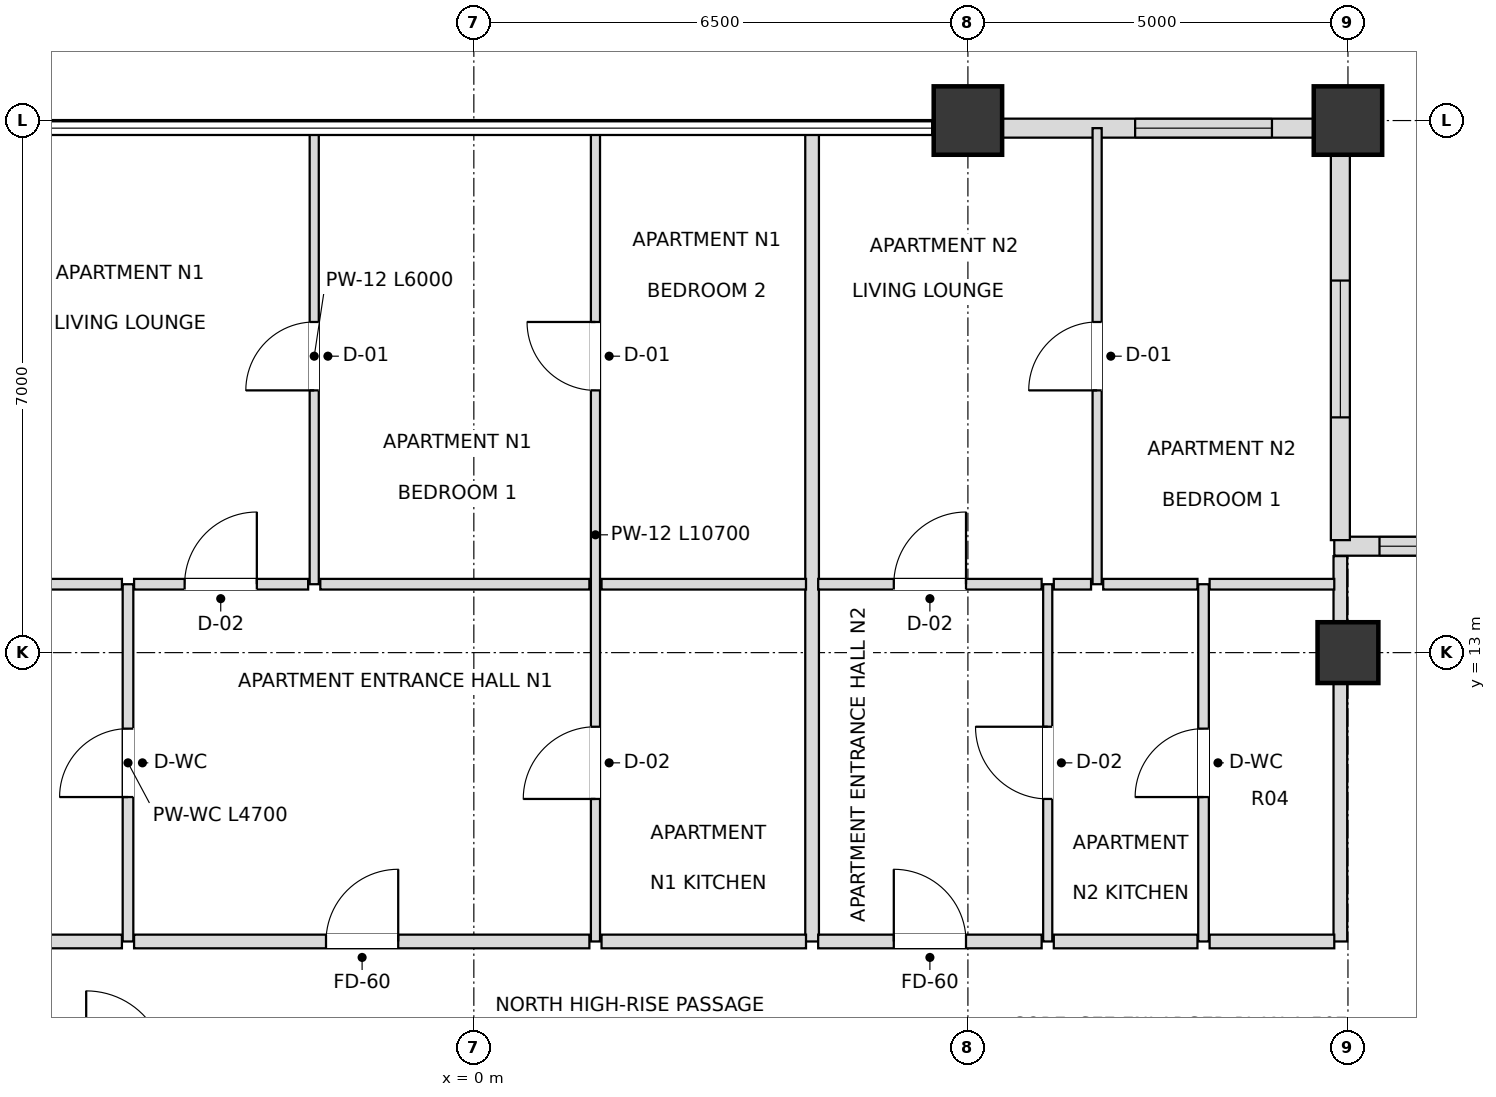
"""IFC4 building model, lengths in metres.
Left out: names, types, materials, properties, quantities, classifications, styles, units other than length and angle.
Written with IfcOpenShell. Run it as: python <this file> out.ifc"""

import sys

from ifc_helpers import new_model, si_unit, direction, frame, frame_2d, origin, origin_2d, place, context, subcontext, project, spatial, rectangle, extrude, element, fill, save


model = new_model("IFC4")
c1 = context("Model", 3, precision=1e-05, world=origin(), true_north=direction((0.0, 1.0)))
c2 = subcontext(c1, "Body", "Model", "MODEL_VIEW")
j1 = project(units=[si_unit("LENGTHUNIT", "METRE"), si_unit("PLANEANGLEUNIT", "RADIAN")], contexts=[c1])
p1 = place(None, origin())
s1 = spatial("IfcSite", under=j1, at=p1, CompositionType="ELEMENT")
p2 = place(p1, origin())
s2 = spatial("IfcBuilding", under=s1, at=p2, CompositionType="ELEMENT")
p3 = place(p2, frame((0.0, 0.0, 247.5)))
s3 = spatial("IfcBuildingStorey", under=s2, at=p3, CompositionType="ELEMENT", Elevation=247.5)
for number, where, z_axis, x_axis in (
    (1, (11.5, 20.0, 0.0), (0.0, 0.0, 1.0), (1.0, 0.0, 0.0)),
    (2, (6.5, 20.0, 0.0), (0.0, 0.0, 1.0), (1.0, 0.0, 0.0)),
):
    element("IfcColumn", number, at=place(p3, frame(where, z_axis=z_axis, x_axis=x_axis)), inside=s3, PredefinedType="USERDEFINED", context=c2, shape_type="SweptSolid", body=[
        extrude(rectangle(XDim=0.9, YDim=0.9, at=origin_2d()), origin(), (0.0, 0.0, 1.0), 3.6),
    ])
p4 = place(p3, frame((11.5, 13.0, 0.0), z_axis=(0.0, 0.0, 1.0), x_axis=(1.0, 0.0, 0.0)))
e3 = element("IfcColumn", 3, at=p4, inside=s3, PredefinedType="COLUMN", context=c2, shape_type="SweptSolid", body=[
    extrude(rectangle(XDim=0.8, YDim=0.8, at=origin_2d()), origin(), (0.0, 0.0, 1.0), 3.6),
])
p5 = place(p3, frame((11.055, 19.9, 0.0), z_axis=(0.0, 0.0, 1.0), x_axis=(-1.0, 0.0, 0.0)))
e4 = element("IfcWall", 4, at=p5, inside=s3, PredefinedType="SOLIDWALL", context=c2, shape_type="SweptSolid", body=[
    extrude(rectangle(XDim=4.11, YDim=0.25, at=frame_2d((2.055, 0.0))), origin(), (0.0, 0.0, 1.0), 2.748),
])
p6 = place(p5, frame((0.555, 0.0, 0.72)))
e5 = element("IfcOpeningElement", 5, at=p6, cuts=e4, PredefinedType="OPENING", context=c2, shape_type="SweptSolid", body=[
    extrude(rectangle(XDim=1.8, YDim=1.68, at=frame_2d((0.9, 0.84))), frame((0.0, 0.135, 0.0), z_axis=(0.0, -1.0, 0.0), x_axis=(1.0, 0.0, 0.0)), (0.0, 0.0, 1.0), 0.27),
])
p7 = place(p3, frame((16.98, 14.4, 0.0), z_axis=(0.0, 0.0, 1.0), x_axis=(-1.0, 0.0, 0.0)))
e6 = element("IfcWall", 6, at=p7, inside=s3, PredefinedType="SOLIDWALL", context=c2, shape_type="SweptSolid", body=[
    extrude(rectangle(XDim=5.66, YDim=0.25, at=frame_2d((2.83, 0.0))), origin(), (0.0, 0.0, 1.0), 2.748),
])
p8 = place(p7, frame((0.595, 0.0, 0.72)))
e7 = element("IfcOpeningElement", 7, at=p8, cuts=e6, PredefinedType="OPENING", context=c2, shape_type="SweptSolid", body=[
    extrude(rectangle(XDim=1.8, YDim=1.68, at=frame_2d((0.9, 0.84))), frame((0.0, 0.135, 0.0), z_axis=(0.0, -1.0, 0.0), x_axis=(1.0, 0.0, 0.0)), (0.0, 0.0, 1.0), 0.27),
])
p9 = place(p7, frame((3.265, 0.0, 0.72)))
e8 = element("IfcOpeningElement", 8, at=p9, cuts=e6, PredefinedType="OPENING", context=c2, shape_type="SweptSolid", body=[
    extrude(rectangle(XDim=1.8, YDim=1.68, at=frame_2d((0.9, 0.84))), frame((0.0, 0.135, 0.0), z_axis=(0.0, -1.0, 0.0), x_axis=(1.0, 0.0, 0.0)), (0.0, 0.0, 1.0), 0.27),
])
p10 = place(p3, frame((11.4, 14.48, 0.0), z_axis=(0.0, 0.0, 1.0), x_axis=(0.0, 1.0, 0.0)))
e9 = element("IfcWall", 9, at=p10, inside=s3, PredefinedType="SOLIDWALL", context=c2, shape_type="SweptSolid", body=[
    extrude(rectangle(XDim=5.34, YDim=0.25, at=frame_2d((2.67, 0.0))), origin(), (0.0, 0.0, 1.0), 2.748),
])
p11 = place(p10, frame((1.615, 0.0, 0.72)))
e10 = element("IfcOpeningElement", 10, at=p11, cuts=e9, PredefinedType="OPENING", context=c2, shape_type="SweptSolid", body=[
    extrude(rectangle(XDim=1.8, YDim=1.68, at=frame_2d((0.9, 0.84))), frame((0.0, 0.135, 0.0), z_axis=(0.0, -1.0, 0.0), x_axis=(1.0, 0.0, 0.0)), (0.0, 0.0, 1.0), 0.27),
])
p12 = place(p3, frame((-4.55, 9.2, 0.0), z_axis=(0.0, 0.0, 1.0), x_axis=(0.0, 1.0, 0.0)))
e11 = element("IfcWall", 11, at=p12, inside=s3, PredefinedType="PARTITIONING", context=c2, shape_type="SweptSolid", body=[
    extrude(rectangle(XDim=4.7, YDim=0.14, at=frame_2d((2.35, 0.0))), origin(), (0.0, 0.0, 1.0), 3.38),
])
p13 = place(p12, frame((1.9, 0.0, 0.0)))
e12 = element("IfcOpeningElement", 12, at=p13, cuts=e11, PredefinedType="OPENING", context=c2, shape_type="SweptSolid", body=[
    extrude(rectangle(XDim=0.9, YDim=2.1, at=frame_2d((0.45, 1.05))), frame((0.0, 0.08, 0.0), z_axis=(0.0, -1.0, 0.0), x_axis=(1.0, 0.0, 0.0)), (0.0, 0.0, 1.0), 0.16),
])
p14 = place(p3, frame((-2.1, 13.9, 0.0), z_axis=(0.0, 0.0, 1.0), x_axis=(0.0, 1.0, 0.0)))
e13 = element("IfcWall", 13, at=p14, inside=s3, PredefinedType="PARTITIONING", context=c2, shape_type="SweptSolid", body=[
    extrude(rectangle(XDim=6.0, YDim=0.12, at=frame_2d((3.0, 0.0))), origin(), (0.0, 0.0, 1.0), 3.018),
])
p15 = place(p14, frame((2.55, 0.0, 0.0)))
e14 = element("IfcOpeningElement", 14, at=p15, cuts=e13, PredefinedType="OPENING", context=c2, shape_type="SweptSolid", body=[
    extrude(rectangle(XDim=0.9, YDim=2.1, at=frame_2d((0.45, 1.05))), frame((0.0, 0.07, 0.0), z_axis=(0.0, -1.0, 0.0), x_axis=(1.0, 0.0, 0.0)), (0.0, 0.0, 1.0), 0.14),
])
p16 = place(p3, frame((1.6, 9.2, 0.0), z_axis=(0.0, 0.0, 1.0), x_axis=(0.0, 1.0, 0.0)))
e15 = element("IfcWall", 15, at=p16, inside=s3, PredefinedType="PARTITIONING", context=c2, shape_type="SweptSolid", body=[
    extrude(rectangle(XDim=10.7, YDim=0.12, at=frame_2d((5.35, 0.0))), origin(), (0.0, 0.0, 1.0), 3.018),
])
p17 = place(p16, frame((1.875, 0.0, 0.0)))
e16 = element("IfcOpeningElement", 16, at=p17, cuts=e15, PredefinedType="OPENING", context=c2, shape_type="SweptSolid", body=[
    extrude(rectangle(XDim=0.95, YDim=2.1, at=frame_2d((0.475, 1.05))), frame((0.0, 0.07, 0.0), z_axis=(0.0, -1.0, 0.0), x_axis=(1.0, 0.0, 0.0)), (0.0, 0.0, 1.0), 0.14),
])
p18 = place(p16, frame((7.25, 0.0, 0.0)))
e17 = element("IfcOpeningElement", 17, at=p18, cuts=e15, PredefinedType="OPENING", context=c2, shape_type="SweptSolid", body=[
    extrude(rectangle(XDim=0.9, YDim=2.1, at=frame_2d((0.45, 1.05))), frame((0.0, 0.07, 0.0), z_axis=(0.0, -1.0, 0.0), x_axis=(1.0, 0.0, 0.0)), (0.0, 0.0, 1.0), 0.14),
])
p19 = place(p3, frame((4.45, 9.2, 0.0), z_axis=(0.0, 0.0, 1.0), x_axis=(0.0, 1.0, 0.0)))
e18 = element("IfcWall", 18, at=p19, inside=s3, PredefinedType="PARTITIONING", context=c2, shape_type="SweptSolid", body=[
    extrude(rectangle(XDim=10.7, YDim=0.18, at=frame_2d((5.35, 0.0))), origin(), (0.0, 0.0, 1.0), 3.018),
])
p20 = place(p3, frame((7.55, 9.2, 0.0), z_axis=(0.0, 0.0, 1.0), x_axis=(0.0, 1.0, 0.0)))
e19 = element("IfcWall", 19, at=p20, inside=s3, PredefinedType="PARTITIONING", context=c2, shape_type="SweptSolid", body=[
    extrude(rectangle(XDim=4.7, YDim=0.12, at=frame_2d((2.35, 0.0))), origin(), (0.0, 0.0, 1.0), 2.826),
])
p21 = place(p20, frame((1.875, 0.0, 0.0)))
e20 = element("IfcOpeningElement", 20, at=p21, cuts=e19, PredefinedType="OPENING", context=c2, shape_type="SweptSolid", body=[
    extrude(rectangle(XDim=0.95, YDim=2.1, at=frame_2d((0.475, 1.05))), frame((0.0, 0.07, 0.0), z_axis=(0.0, -1.0, 0.0), x_axis=(1.0, 0.0, 0.0)), (0.0, 0.0, 1.0), 0.14),
])
p22 = place(p3, frame((8.2, 13.9, 0.0), z_axis=(0.0, 0.0, 1.0), x_axis=(0.0, 1.0, 0.0)))
e21 = element("IfcWall", 21, at=p22, inside=s3, PredefinedType="PARTITIONING", context=c2, shape_type="SweptSolid", body=[
    extrude(rectangle(XDim=6.0, YDim=0.12, at=frame_2d((3.0, 0.0))), origin(), (0.0, 0.0, 1.0), 3.38),
])
p23 = place(p22, frame((2.55, 0.0, 0.0)))
e22 = element("IfcOpeningElement", 22, at=p23, cuts=e21, PredefinedType="OPENING", context=c2, shape_type="SweptSolid", body=[
    extrude(rectangle(XDim=0.9, YDim=2.1, at=frame_2d((0.45, 1.05))), frame((0.0, 0.07, 0.0), z_axis=(0.0, -1.0, 0.0), x_axis=(1.0, 0.0, 0.0)), (0.0, 0.0, 1.0), 0.14),
])
p24 = place(p3, frame((9.6, 9.2, 0.0), z_axis=(0.0, 0.0, 1.0), x_axis=(0.0, 1.0, 0.0)))
e23 = element("IfcWall", 23, at=p24, inside=s3, PredefinedType="PARTITIONING", context=c2, shape_type="SweptSolid", body=[
    extrude(rectangle(XDim=4.7, YDim=0.14, at=frame_2d((2.35, 0.0))), origin(), (0.0, 0.0, 1.0), 2.826),
])
p25 = place(p24, frame((1.9, 0.0, 0.0)))
e24 = element("IfcOpeningElement", 24, at=p25, cuts=e23, PredefinedType="OPENING", context=c2, shape_type="SweptSolid", body=[
    extrude(rectangle(XDim=0.9, YDim=2.1, at=frame_2d((0.45, 1.05))), frame((0.0, 0.08, 0.0), z_axis=(0.0, -1.0, 0.0), x_axis=(1.0, 0.0, 0.0)), (0.0, 0.0, 1.0), 0.16),
])
p26 = place(p3, frame((11.4, 9.2, 0.0), z_axis=(0.0, 0.0, 1.0), x_axis=(0.0, 1.0, 0.0)))
e25 = element("IfcWall", 25, at=p26, inside=s3, PredefinedType="PARTITIONING", context=c2, shape_type="SweptSolid", body=[
    extrude(rectangle(XDim=5.07, YDim=0.18, at=frame_2d((2.535, 0.0))), origin(), (0.0, 0.0, 1.0), 2.748),
])
p27 = place(p3, frame((-6.42, 9.2, 0.0), z_axis=(0.0, 0.0, 1.0), x_axis=(1.0, 0.0, 0.0)))
e26 = element("IfcWall", 26, at=p27, inside=s3, PredefinedType="PARTITIONING", context=c2, shape_type="SweptSolid", body=[
    extrude(rectangle(XDim=1.79, YDim=0.18, at=frame_2d((0.895, 0.0))), origin(), (0.0, 0.0, 1.0), 3.38),
])
p28 = place(p3, frame((-4.47, 9.2, 0.0), z_axis=(0.0, 0.0, 1.0), x_axis=(1.0, 0.0, 0.0)))
e27 = element("IfcWall", 27, at=p28, inside=s3, PredefinedType="PARTITIONING", context=c2, shape_type="SweptSolid", body=[
    extrude(rectangle(XDim=5.99, YDim=0.18, at=frame_2d((2.995, 0.0))), origin(), (0.0, 0.0, 1.0), 3.38),
])
p29 = place(p28, frame((2.525, 0.0, 0.0)))
e28 = element("IfcOpeningElement", 28, at=p29, cuts=e27, PredefinedType="OPENING", context=c2, shape_type="SweptSolid", body=[
    extrude(rectangle(XDim=0.95, YDim=2.15, at=frame_2d((0.475, 1.075))), frame((0.0, 0.1, 0.0), z_axis=(0.0, -1.0, 0.0), x_axis=(1.0, 0.0, 0.0)), (0.0, 0.0, 1.0), 0.2),
])
p30 = place(p3, frame((1.68, 9.2, 0.0), z_axis=(0.0, 0.0, 1.0), x_axis=(1.0, 0.0, 0.0)))
e29 = element("IfcWall", 29, at=p30, inside=s3, PredefinedType="PARTITIONING", context=c2, shape_type="SweptSolid", body=[
    extrude(rectangle(XDim=2.69, YDim=0.18, at=frame_2d((1.345, 0.0))), origin(), (0.0, 0.0, 1.0), 3.38),
])
p31 = place(p3, frame((4.53, 9.2, 0.0), z_axis=(0.0, 0.0, 1.0), x_axis=(1.0, 0.0, 0.0)))
e30 = element("IfcWall", 30, at=p31, inside=s3, PredefinedType="PARTITIONING", context=c2, shape_type="SweptSolid", body=[
    extrude(rectangle(XDim=2.94, YDim=0.18, at=frame_2d((1.47, 0.0))), origin(), (0.0, 0.0, 1.0), 2.826),
])
p32 = place(p31, frame((0.995, 0.0, 0.0)))
e31 = element("IfcOpeningElement", 31, at=p32, cuts=e30, PredefinedType="OPENING", context=c2, shape_type="SweptSolid", body=[
    extrude(rectangle(XDim=0.95, YDim=2.15, at=frame_2d((0.475, 1.075))), frame((0.0, 0.1, 0.0), z_axis=(0.0, -1.0, 0.0), x_axis=(1.0, 0.0, 0.0)), (0.0, 0.0, 1.0), 0.2),
])
p33 = place(p3, frame((7.63, 9.2, 0.0), z_axis=(0.0, 0.0, 1.0), x_axis=(1.0, 0.0, 0.0)))
e32 = element("IfcWall", 32, at=p33, inside=s3, PredefinedType="PARTITIONING", context=c2, shape_type="SweptSolid", body=[
    extrude(rectangle(XDim=1.89, YDim=0.18, at=frame_2d((0.945, 0.0))), origin(), (0.0, 0.0, 1.0), 3.38),
])
p34 = place(p3, frame((9.68, 9.2, 0.0), z_axis=(0.0, 0.0, 1.0), x_axis=(1.0, 0.0, 0.0)))
e33 = element("IfcWall", 33, at=p34, inside=s3, PredefinedType="PARTITIONING", context=c2, shape_type="SweptSolid", body=[
    extrude(rectangle(XDim=1.64, YDim=0.18, at=frame_2d((0.82, 0.0))), origin(), (0.0, 0.0, 1.0), 3.38),
])
p35 = place(p3, frame((-6.42, 13.9, 0.0), z_axis=(0.0, 0.0, 1.0), x_axis=(1.0, 0.0, 0.0)))
e34 = element("IfcWall", 34, at=p35, inside=s3, PredefinedType="PARTITIONING", context=c2, shape_type="SweptSolid", body=[
    extrude(rectangle(XDim=1.79, YDim=0.14, at=frame_2d((0.895, 0.0))), origin(), (0.0, 0.0, 1.0), 3.38),
])
p36 = place(p3, frame((-4.47, 13.9, 0.0), z_axis=(0.0, 0.0, 1.0), x_axis=(1.0, 0.0, 0.0)))
e35 = element("IfcWall", 35, at=p36, inside=s3, PredefinedType="PARTITIONING", context=c2, shape_type="SweptSolid", body=[
    extrude(rectangle(XDim=2.29, YDim=0.14, at=frame_2d((1.145, 0.0))), origin(), (0.0, 0.0, 1.0), 3.38),
])
p37 = place(p36, frame((0.665, 0.0, 0.0)))
e36 = element("IfcOpeningElement", 36, at=p37, cuts=e35, PredefinedType="OPENING", context=c2, shape_type="SweptSolid", body=[
    extrude(rectangle(XDim=0.95, YDim=2.1, at=frame_2d((0.475, 1.05))), frame((0.0, 0.08, 0.0), z_axis=(0.0, -1.0, 0.0), x_axis=(1.0, 0.0, 0.0)), (0.0, 0.0, 1.0), 0.16),
])
p38 = place(p3, frame((-2.02, 13.9, 0.0), z_axis=(0.0, 0.0, 1.0), x_axis=(1.0, 0.0, 0.0)))
e37 = element("IfcWall", 37, at=p38, inside=s3, PredefinedType="PARTITIONING", context=c2, shape_type="SweptSolid", body=[
    extrude(rectangle(XDim=3.54, YDim=0.14, at=frame_2d((1.77, 0.0))), origin(), (0.0, 0.0, 1.0), 3.38),
])
p39 = place(p3, frame((1.68, 13.9, 0.0), z_axis=(0.0, 0.0, 1.0), x_axis=(1.0, 0.0, 0.0)))
e38 = element("IfcWall", 38, at=p39, inside=s3, PredefinedType="PARTITIONING", context=c2, shape_type="SweptSolid", body=[
    extrude(rectangle(XDim=2.69, YDim=0.14, at=frame_2d((1.345, 0.0))), origin(), (0.0, 0.0, 1.0), 3.38),
])
p40 = place(p3, frame((4.53, 13.9, 0.0), z_axis=(0.0, 0.0, 1.0), x_axis=(1.0, 0.0, 0.0)))
e39 = element("IfcWall", 39, at=p40, inside=s3, PredefinedType="PARTITIONING", context=c2, shape_type="SweptSolid", body=[
    extrude(rectangle(XDim=2.94, YDim=0.14, at=frame_2d((1.47, 0.0))), origin(), (0.0, 0.0, 1.0), 2.826),
])
p41 = place(p40, frame((0.995, 0.0, 0.0)))
e40 = element("IfcOpeningElement", 40, at=p41, cuts=e39, PredefinedType="OPENING", context=c2, shape_type="SweptSolid", body=[
    extrude(rectangle(XDim=0.95, YDim=2.1, at=frame_2d((0.475, 1.05))), frame((0.0, 0.08, 0.0), z_axis=(0.0, -1.0, 0.0), x_axis=(1.0, 0.0, 0.0)), (0.0, 0.0, 1.0), 0.16),
])
p42 = place(p3, frame((7.63, 13.9, 0.0), z_axis=(0.0, 0.0, 1.0), x_axis=(1.0, 0.0, 0.0)))
e41 = element("IfcWall", 41, at=p42, inside=s3, PredefinedType="PARTITIONING", context=c2, shape_type="SweptSolid", body=[
    extrude(rectangle(XDim=0.49, YDim=0.14, at=frame_2d((0.245, 0.0))), origin(), (0.0, 0.0, 1.0), 3.38),
])
p43 = place(p3, frame((8.28, 13.9, 0.0), z_axis=(0.0, 0.0, 1.0), x_axis=(1.0, 0.0, 0.0)))
e42 = element("IfcWall", 42, at=p43, inside=s3, PredefinedType="PARTITIONING", context=c2, shape_type="SweptSolid", body=[
    extrude(rectangle(XDim=1.24, YDim=0.14, at=frame_2d((0.62, 0.0))), origin(), (0.0, 0.0, 1.0), 3.38),
])
p44 = place(p3, frame((9.68, 13.9, 0.0), z_axis=(0.0, 0.0, 1.0), x_axis=(1.0, 0.0, 0.0)))
e43 = element("IfcWall", 43, at=p44, inside=s3, PredefinedType="PARTITIONING", context=c2, shape_type="SweptSolid", body=[
    extrude(rectangle(XDim=1.64, YDim=0.14, at=frame_2d((0.82, 0.0))), origin(), (0.0, 0.0, 1.0), 3.38),
])
p45 = place(p6, origin())
e44 = element("IfcWindow", 44, at=p45, inside=s3, PartitioningType="SINGLE_PANEL", PredefinedType="WINDOW", context=c2, shape_type="SweptSolid", body=[
    extrude(rectangle(XDim=1.8, YDim=1.68, at=frame_2d((0.9, 0.84))), frame((0.0, 0.03, 0.0), z_axis=(0.0, -1.0, 0.0), x_axis=(1.0, 0.0, 0.0)), (0.0, 0.0, 1.0), 0.06),
])
fill(e5, e44)
p46 = place(p9, origin())
e45 = element("IfcWindow", 45, at=p46, inside=s3, PartitioningType="SINGLE_PANEL", PredefinedType="WINDOW", context=c2, shape_type="SweptSolid", body=[
    extrude(rectangle(XDim=1.8, YDim=1.68, at=frame_2d((0.9, 0.84))), frame((0.0, 0.03, 0.0), z_axis=(0.0, -1.0, 0.0), x_axis=(1.0, 0.0, 0.0)), (0.0, 0.0, 1.0), 0.06),
])
fill(e8, e45)
p47 = place(p11, origin())
e46 = element("IfcWindow", 46, at=p47, inside=s3, PartitioningType="SINGLE_PANEL", PredefinedType="WINDOW", context=c2, shape_type="SweptSolid", body=[
    extrude(rectangle(XDim=1.8, YDim=1.68, at=frame_2d((0.9, 0.84))), frame((0.0, 0.03, 0.0), z_axis=(0.0, -1.0, 0.0), x_axis=(1.0, 0.0, 0.0)), (0.0, 0.0, 1.0), 0.06),
])
fill(e10, e46)
p48 = place(p13, origin())
e47 = element("IfcDoor", 47, at=p48, inside=s3, OperationType="SINGLE_SWING_LEFT", PredefinedType="DOOR", context=c2, shape_type="SweptSolid", body=[
    extrude(rectangle(XDim=0.9, YDim=2.1, at=frame_2d((0.45, 1.05))), frame((0.0, 0.025, 0.0), z_axis=(0.0, -1.0, 0.0), x_axis=(1.0, 0.0, 0.0)), (0.0, 0.0, 1.0), 0.05),
])
fill(e12, e47)
p49 = place(p29, origin())
e48 = element("IfcDoor", 48, at=p49, inside=s3, OperationType="SINGLE_SWING_RIGHT", PredefinedType="DOOR", context=c2, shape_type="SweptSolid", body=[
    extrude(rectangle(XDim=0.95, YDim=2.15, at=frame_2d((0.475, 1.075))), frame((0.0, 0.025, 0.0), z_axis=(0.0, -1.0, 0.0), x_axis=(1.0, 0.0, 0.0)), (0.0, 0.0, 1.0), 0.05),
])
fill(e28, e48)
p50 = place(p17, origin())
e49 = element("IfcDoor", 49, at=p50, inside=s3, OperationType="SINGLE_SWING_LEFT", PredefinedType="DOOR", context=c2, shape_type="SweptSolid", body=[
    extrude(rectangle(XDim=0.95, YDim=2.1, at=frame_2d((0.475, 1.05))), frame((0.0, 0.025, 0.0), z_axis=(0.0, -1.0, 0.0), x_axis=(1.0, 0.0, 0.0)), (0.0, 0.0, 1.0), 0.05),
])
fill(e16, e49)
p51 = place(p37, origin())
e50 = element("IfcDoor", 50, at=p51, inside=s3, OperationType="SINGLE_SWING_RIGHT", PredefinedType="DOOR", context=c2, shape_type="SweptSolid", body=[
    extrude(rectangle(XDim=0.95, YDim=2.1, at=frame_2d((0.475, 1.05))), frame((0.0, 0.025, 0.0), z_axis=(0.0, -1.0, 0.0), x_axis=(1.0, 0.0, 0.0)), (0.0, 0.0, 1.0), 0.05),
])
fill(e36, e50)
p52 = place(p15, origin())
e51 = element("IfcDoor", 51, at=p52, inside=s3, OperationType="SINGLE_SWING_LEFT", PredefinedType="DOOR", context=c2, shape_type="SweptSolid", body=[
    extrude(rectangle(XDim=0.9, YDim=2.1, at=frame_2d((0.45, 1.05))), frame((0.0, 0.025, 0.0), z_axis=(0.0, -1.0, 0.0), x_axis=(1.0, 0.0, 0.0)), (0.0, 0.0, 1.0), 0.05),
])
fill(e14, e51)
p53 = place(p18, origin())
e52 = element("IfcDoor", 52, at=p53, inside=s3, OperationType="SINGLE_SWING_RIGHT", PredefinedType="DOOR", context=c2, shape_type="SweptSolid", body=[
    extrude(rectangle(XDim=0.9, YDim=2.1, at=frame_2d((0.45, 1.05))), frame((0.0, 0.025, 0.0), z_axis=(0.0, -1.0, 0.0), x_axis=(1.0, 0.0, 0.0)), (0.0, 0.0, 1.0), 0.05),
])
fill(e17, e52)
p54 = place(p32, origin())
e53 = element("IfcDoor", 53, at=p54, inside=s3, OperationType="SINGLE_SWING_LEFT", PredefinedType="DOOR", context=c2, shape_type="SweptSolid", body=[
    extrude(rectangle(XDim=0.95, YDim=2.15, at=frame_2d((0.475, 1.075))), frame((0.0, 0.025, 0.0), z_axis=(0.0, -1.0, 0.0), x_axis=(1.0, 0.0, 0.0)), (0.0, 0.0, 1.0), 0.05),
])
fill(e31, e53)
p55 = place(p21, origin())
e54 = element("IfcDoor", 54, at=p55, inside=s3, OperationType="SINGLE_SWING_RIGHT", PredefinedType="DOOR", context=c2, shape_type="SweptSolid", body=[
    extrude(rectangle(XDim=0.95, YDim=2.1, at=frame_2d((0.475, 1.05))), frame((0.0, 0.025, 0.0), z_axis=(0.0, -1.0, 0.0), x_axis=(1.0, 0.0, 0.0)), (0.0, 0.0, 1.0), 0.05),
])
fill(e20, e54)
p56 = place(p25, origin())
e55 = element("IfcDoor", 55, at=p56, inside=s3, OperationType="SINGLE_SWING_LEFT", PredefinedType="DOOR", context=c2, shape_type="SweptSolid", body=[
    extrude(rectangle(XDim=0.9, YDim=2.1, at=frame_2d((0.45, 1.05))), frame((0.0, 0.025, 0.0), z_axis=(0.0, -1.0, 0.0), x_axis=(1.0, 0.0, 0.0)), (0.0, 0.0, 1.0), 0.05),
])
fill(e24, e55)
p57 = place(p41, origin())
e56 = element("IfcDoor", 56, at=p57, inside=s3, OperationType="SINGLE_SWING_RIGHT", PredefinedType="DOOR", context=c2, shape_type="SweptSolid", body=[
    extrude(rectangle(XDim=0.95, YDim=2.1, at=frame_2d((0.475, 1.05))), frame((0.0, 0.025, 0.0), z_axis=(0.0, -1.0, 0.0), x_axis=(1.0, 0.0, 0.0)), (0.0, 0.0, 1.0), 0.05),
])
fill(e40, e56)
p58 = place(p23, origin())
e57 = element("IfcDoor", 57, at=p58, inside=s3, OperationType="SINGLE_SWING_LEFT", PredefinedType="DOOR", context=c2, shape_type="SweptSolid", body=[
    extrude(rectangle(XDim=0.9, YDim=2.1, at=frame_2d((0.45, 1.05))), frame((0.0, 0.025, 0.0), z_axis=(0.0, -1.0, 0.0), x_axis=(1.0, 0.0, 0.0)), (0.0, 0.0, 1.0), 0.05),
])
fill(e22, e57)
save(model, sys.argv[1])
